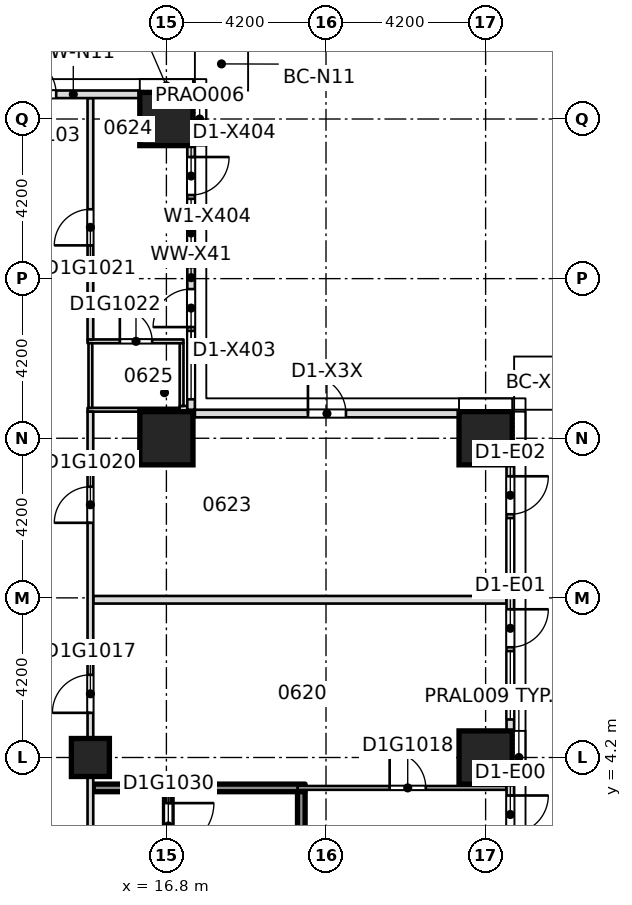
"""IFC4 building model, lengths in metres.
Left out: names, types, materials, properties, quantities, classifications, styles, units other than length and angle.
Written with IfcOpenShell. Run it as: python <this file> out.ifc"""

import sys

from ifc_helpers import new_model, si_unit, direction, frame, frame_2d, origin, origin_2d, place, context, subcontext, project, spatial, rectangle, extrude, element, fill, save


model = new_model("IFC4")
c1 = context("Model", 3, precision=1e-05, world=origin(), true_north=direction((0.0, 1.0)))
c2 = subcontext(c1, "Body", "Model", "MODEL_VIEW")
j1 = project(units=[si_unit("LENGTHUNIT", "METRE"), si_unit("PLANEANGLEUNIT", "RADIAN")], contexts=[c1])
p1 = place(None, origin())
s1 = spatial("IfcSite", under=j1, at=p1, CompositionType="ELEMENT")
p2 = place(p1, origin())
s2 = spatial("IfcBuilding", under=s1, at=p2, CompositionType="ELEMENT")
p3 = place(p2, frame((0.0, 0.0, 34.5)))
s3 = spatial("IfcBuildingStorey", under=s2, at=p3, CompositionType="ELEMENT", Elevation=34.5)
for number, where, z_axis, x_axis in (
    (1, (25.2, 4.2, -0.32), (0.0, 0.0, 1.0), (1.0, 0.0, 0.0)),
    (2, (16.8, 12.6, -0.32), (0.0, 0.0, 1.0), (1.0, 0.0, 0.0)),
    (3, (25.2, 12.6, -0.32), (0.0, 0.0, 1.0), (1.0, 0.0, 0.0)),
    (4, (16.8, 21.0, -0.32), (0.0, 0.0, 1.0), (1.0, 0.0, 0.0)),
):
    element("IfcColumn", number, at=place(p3, frame(where, z_axis=z_axis, x_axis=x_axis)), inside=s3, PredefinedType="COLUMN", context=c2, shape_type="SweptSolid", body=[
        extrude(rectangle(XDim=1.4, YDim=1.4, at=origin_2d()), origin(), (0.0, 0.0, 1.0), 3.45),
    ])
p4 = place(p3, frame((14.8, 4.2, -0.32), z_axis=(0.0, 0.0, 1.0), x_axis=(1.0, 0.0, 0.0)))
e5 = element("IfcColumn", 5, at=p4, inside=s3, PredefinedType="COLUMN", context=c2, shape_type="SweptSolid", body=[
    extrude(rectangle(XDim=1.0, YDim=1.0, at=origin_2d()), origin(), (0.0, 0.0, 1.0), 3.45),
])
p5 = place(p3, frame((14.875, 3.4, 0.0), z_axis=(0.0, 0.0, 1.0), x_axis=(1.0, 0.0, 0.0)))
e6 = element("IfcWall", 6, at=p5, inside=s3, PredefinedType="SOLIDWALL", context=c2, shape_type="SweptSolid", body=[
    extrude(rectangle(XDim=5.575, YDim=0.2, at=frame_2d((2.788, 0.0))), origin(), (0.0, 0.0, 1.0), 3.13),
])
p6 = place(p3, frame((20.25, 3.4, 0.0), z_axis=(0.0, 0.0, 1.0), x_axis=(1.0, 0.0, 0.0)))
e7 = element("IfcWall", 7, at=p6, inside=s3, PredefinedType="PARTITIONING", context=c2, shape_type="SweptSolid", body=[
    extrude(rectangle(XDim=5.5, YDim=0.1, at=frame_2d((2.75, 0.0))), origin(), (0.0, 0.0, 1.0), 3.13),
])
p7 = place(p6, frame((2.425, 0.0, 0.0)))
e8 = element("IfcOpeningElement", 8, at=p7, cuts=e7, PredefinedType="OPENING", context=c2, shape_type="SweptSolid", body=[
    extrude(rectangle(XDim=0.95, YDim=2.1, at=frame_2d((0.475, 1.05))), frame((0.0, 0.06, 0.0), z_axis=(0.0, -1.0, 0.0), x_axis=(1.0, 0.0, 0.0)), (0.0, 0.0, 1.0), 0.12),
])
p8 = place(p3, frame((14.875, 8.35, 0.0), z_axis=(0.0, 0.0, 1.0), x_axis=(1.0, 0.0, 0.0)))
e9 = element("IfcWall", 9, at=p8, inside=s3, PredefinedType="PARTITIONING", context=c2, shape_type="SweptSolid", body=[
    extrude(rectangle(XDim=10.875, YDim=0.2, at=frame_2d((5.438, 0.0))), origin(), (0.0, 0.0, 1.0), 3.13),
])
p9 = place(p3, frame((14.725, 13.35, 0.0), z_axis=(0.0, 0.0, 1.0), x_axis=(1.0, 0.0, 0.0)))
e10 = element("IfcWall", 10, at=p9, inside=s3, PredefinedType="PARTITIONING", context=c2, shape_type="SweptSolid", body=[
    extrude(rectangle(XDim=2.525, YDim=0.1, at=frame_2d((1.262, 0.0))), origin(), (0.0, 0.0, 1.0), 3.13),
])
p10 = place(p3, frame((17.15, 13.35, 0.0), z_axis=(0.0, 0.0, 1.0), x_axis=(1.0, 0.0, 0.0)))
e11 = element("IfcWall", 11, at=p10, inside=s3, PredefinedType="PARTITIONING", context=c2, shape_type="SweptSolid", body=[
    extrude(rectangle(XDim=0.2, YDim=0.2, at=frame_2d((0.1, 0.0))), origin(), (0.0, 0.0, 1.0), 3.13),
])
p11 = place(p3, frame((14.725, 15.15, 0.0), z_axis=(0.0, 0.0, 1.0), x_axis=(1.0, 0.0, 0.0)))
e12 = element("IfcWall", 12, at=p11, inside=s3, PredefinedType="PARTITIONING", context=c2, shape_type="SweptSolid", body=[
    extrude(rectangle(XDim=2.525, YDim=0.1, at=frame_2d((1.262, 0.0))), origin(), (0.0, 0.0, 1.0), 3.13),
])
p12 = place(p11, frame((0.85, 0.0, 0.0)))
e13 = element("IfcOpeningElement", 13, at=p12, cuts=e12, PredefinedType="OPENING", context=c2, shape_type="SweptSolid", body=[
    extrude(rectangle(XDim=0.85, YDim=2.1, at=frame_2d((0.425, 1.05))), frame((0.0, 0.06, 0.0), z_axis=(0.0, -1.0, 0.0), x_axis=(1.0, 0.0, 0.0)), (0.0, 0.0, 1.0), 0.12),
])
p13 = place(p3, frame((14.8, -10.525, 0.0), z_axis=(0.0, 0.0, 1.0), x_axis=(0.0, 1.0, 0.0)))
e14 = element("IfcWall", 14, at=p13, inside=s3, PredefinedType="PARTITIONING", context=c2, shape_type="SweptSolid", body=[
    extrude(rectangle(XDim=23.825, YDim=0.15, at=frame_2d((11.913, 0.0))), origin(), (0.0, 0.0, 1.0), 3.13),
])
p14 = place(p13, frame((0.925, 0.0, 0.0)))
e15 = element("IfcOpeningElement", 15, at=p14, cuts=e14, PredefinedType="OPENING", context=c2, shape_type="SweptSolid", body=[
    extrude(rectangle(XDim=1.0, YDim=2.1, at=frame_2d((0.5, 1.05))), frame((0.0, 0.085, 0.0), z_axis=(0.0, -1.0, 0.0), x_axis=(1.0, 0.0, 0.0)), (0.0, 0.0, 1.0), 0.17),
])
p15 = place(p13, frame((15.9, 0.0, 0.0)))
e16 = element("IfcOpeningElement", 16, at=p15, cuts=e14, PredefinedType="OPENING", context=c2, shape_type="SweptSolid", body=[
    extrude(rectangle(XDim=1.0, YDim=2.1, at=frame_2d((0.5, 1.05))), frame((0.0, 0.085, 0.0), z_axis=(0.0, -1.0, 0.0), x_axis=(1.0, 0.0, 0.0)), (0.0, 0.0, 1.0), 0.17),
])
p16 = place(p13, frame((20.9, 0.0, 0.0)))
e17 = element("IfcOpeningElement", 17, at=p16, cuts=e14, PredefinedType="OPENING", context=c2, shape_type="SweptSolid", body=[
    extrude(rectangle(XDim=0.95, YDim=2.1, at=frame_2d((0.475, 1.05))), frame((0.0, 0.085, 0.0), z_axis=(0.0, -1.0, 0.0), x_axis=(1.0, 0.0, 0.0)), (0.0, 0.0, 1.0), 0.17),
])
p17 = place(p13, frame((9.975, 0.0, 0.0)))
e18 = element("IfcOpeningElement", 18, at=p17, cuts=e14, PredefinedType="OPENING", context=c2, shape_type="SweptSolid", body=[
    extrude(rectangle(XDim=1.1, YDim=2.1, at=frame_2d((0.55, 1.05))), frame((0.0, 0.085, 0.0), z_axis=(0.0, -1.0, 0.0), x_axis=(1.0, 0.0, 0.0)), (0.0, 0.0, 1.0), 0.17),
])
p18 = place(p13, frame((4.725, 0.0, 0.0)))
e19 = element("IfcOpeningElement", 19, at=p18, cuts=e14, PredefinedType="OPENING", context=c2, shape_type="SweptSolid", body=[
    extrude(rectangle(XDim=1.0, YDim=2.1, at=frame_2d((0.5, 1.05))), frame((0.0, 0.085, 0.0), z_axis=(0.0, -1.0, 0.0), x_axis=(1.0, 0.0, 0.0)), (0.0, 0.0, 1.0), 0.17),
])
p19 = place(p3, frame((14.8, 13.4, 0.0), z_axis=(0.0, 0.0, 1.0), x_axis=(0.0, 1.0, 0.0)))
e20 = element("IfcWall", 20, at=p19, inside=s3, PredefinedType="PARTITIONING", context=c2, shape_type="SweptSolid", body=[
    extrude(rectangle(XDim=1.7, YDim=0.1, at=frame_2d((0.85, 0.0))), origin(), (0.0, 0.0, 1.0), 3.13),
])
p20 = place(p3, frame((14.8, 15.2, 0.0), z_axis=(0.0, 0.0, 1.0), x_axis=(0.0, 1.0, 0.0)))
e21 = element("IfcWall", 21, at=p20, inside=s3, PredefinedType="PARTITIONING", context=c2, shape_type="SweptSolid", body=[
    extrude(rectangle(XDim=6.35, YDim=0.15, at=frame_2d((3.175, 0.0))), origin(), (0.0, 0.0, 1.0), 3.13),
])
p21 = place(p20, frame((2.475, 0.0, 0.0)))
e22 = element("IfcOpeningElement", 22, at=p21, cuts=e21, PredefinedType="OPENING", context=c2, shape_type="SweptSolid", body=[
    extrude(rectangle(XDim=0.95, YDim=2.1, at=frame_2d((0.475, 1.05))), frame((0.0, 0.085, 0.0), z_axis=(0.0, -1.0, 0.0), x_axis=(1.0, 0.0, 0.0)), (0.0, 0.0, 1.0), 0.17),
])
p22 = place(p3, frame((16.85, -3.3, 0.0), z_axis=(0.0, 0.0, 1.0), x_axis=(0.0, 1.0, 0.0)))
e23 = element("IfcWall", 23, at=p22, inside=s3, PredefinedType="SOLIDWALL", context=c2, shape_type="SweptSolid", body=[
    extrude(rectangle(XDim=6.6, YDim=0.2, at=frame_2d((3.3, 0.0))), origin(), (0.0, 0.0, 1.0), 3.13),
])
p23 = place(p22, frame((5.1, 0.0, 0.0)))
e24 = element("IfcOpeningElement", 24, at=p23, cuts=e23, PredefinedType="OPENING", context=c2, shape_type="SweptSolid", body=[
    extrude(rectangle(XDim=1.2, YDim=2.1, at=frame_2d((0.6, 1.05))), frame((0.0, 0.11, 0.0), z_axis=(0.0, -1.0, 0.0), x_axis=(1.0, 0.0, 0.0)), (0.0, 0.0, 1.0), 0.22),
])
p24 = place(p3, frame((17.2, 13.45, 0.0), z_axis=(0.0, 0.0, 1.0), x_axis=(0.0, 1.0, 0.0)))
e25 = element("IfcWall", 25, at=p24, inside=s3, PredefinedType="PARTITIONING", context=c2, shape_type="SweptSolid", body=[
    extrude(rectangle(XDim=1.65, YDim=0.1, at=frame_2d((0.825, 0.0))), origin(), (0.0, 0.0, 1.0), 3.13),
])
p25 = place(p3, frame((20.35, -0.53, 0.0), z_axis=(0.0, 0.0, 1.0), x_axis=(0.0, 1.0, 0.0)))
e26 = element("IfcWall", 26, at=p25, inside=s3, PredefinedType="SOLIDWALL", context=c2, shape_type="SweptSolid", body=[
    extrude(rectangle(XDim=3.83, YDim=0.2, at=frame_2d((1.915, 0.0))), origin(), (0.0, 0.0, 1.0), 3.13),
])
p26 = place(p3, frame((25.85, -3.5, 0.0), z_axis=(0.0, 0.0, 1.0), x_axis=(0.0, 1.0, 0.0)))
e27 = element("IfcWall", 27, at=p26, inside=s3, PredefinedType="STANDARD", context=c2, shape_type="SweptSolid", body=[
    extrude(rectangle(XDim=7.0, YDim=0.2, at=frame_2d((3.5, 0.0))), origin(), (0.0, 0.0, 1.0), 3.13),
])
p27 = place(p26, frame((0.3, 0.0, 0.2)))
e28 = element("IfcOpeningElement", 28, at=p27, cuts=e27, PredefinedType="OPENING", context=c2, shape_type="SweptSolid", body=[
    extrude(rectangle(XDim=1.8, YDim=2.65, at=frame_2d((0.9, 1.325))), frame((0.0, 0.11, 0.0), z_axis=(0.0, -1.0, 0.0), x_axis=(1.0, 0.0, 0.0)), (0.0, 0.0, 1.0), 0.22),
])
p28 = place(p26, frame((2.2, 0.0, 0.0)))
e29 = element("IfcOpeningElement", 29, at=p28, cuts=e27, PredefinedType="OPENING", context=c2, shape_type="SweptSolid", body=[
    extrude(rectangle(XDim=1.0, YDim=2.4, at=frame_2d((0.5, 1.2))), frame((0.0, 0.11, 0.0), z_axis=(0.0, -1.0, 0.0), x_axis=(1.0, 0.0, 0.0)), (0.0, 0.0, 1.0), 0.22),
])
p29 = place(p26, frame((3.8, 0.0, 0.2)))
e30 = element("IfcOpeningElement", 30, at=p29, cuts=e27, PredefinedType="OPENING", context=c2, shape_type="SweptSolid", body=[
    extrude(rectangle(XDim=1.8, YDim=2.65, at=frame_2d((0.9, 1.325))), frame((0.0, 0.11, 0.0), z_axis=(0.0, -1.0, 0.0), x_axis=(1.0, 0.0, 0.0)), (0.0, 0.0, 1.0), 0.22),
])
p30 = place(p26, frame((5.7, 0.0, 0.0)))
e31 = element("IfcOpeningElement", 31, at=p30, cuts=e27, PredefinedType="OPENING", context=c2, shape_type="SweptSolid", body=[
    extrude(rectangle(XDim=1.0, YDim=2.4, at=frame_2d((0.5, 1.2))), frame((0.0, 0.11, 0.0), z_axis=(0.0, -1.0, 0.0), x_axis=(1.0, 0.0, 0.0)), (0.0, 0.0, 1.0), 0.22),
])
p31 = place(p3, frame((25.85, 4.9, 0.0), z_axis=(0.0, 0.0, 1.0), x_axis=(0.0, 1.0, 0.0)))
e32 = element("IfcWall", 32, at=p31, inside=s3, PredefinedType="STANDARD", context=c2, shape_type="SweptSolid", body=[
    extrude(rectangle(XDim=7.0, YDim=0.2, at=frame_2d((3.5, 0.0))), origin(), (0.0, 0.0, 1.0), 3.13),
])
p32 = place(p31, frame((0.3, 0.0, 0.2)))
e33 = element("IfcOpeningElement", 33, at=p32, cuts=e32, PredefinedType="OPENING", context=c2, shape_type="SweptSolid", body=[
    extrude(rectangle(XDim=1.8, YDim=2.65, at=frame_2d((0.9, 1.325))), frame((0.0, 0.11, 0.0), z_axis=(0.0, -1.0, 0.0), x_axis=(1.0, 0.0, 0.0)), (0.0, 0.0, 1.0), 0.22),
])
p33 = place(p31, frame((2.2, 0.0, 0.0)))
e34 = element("IfcOpeningElement", 34, at=p33, cuts=e32, PredefinedType="OPENING", context=c2, shape_type="SweptSolid", body=[
    extrude(rectangle(XDim=1.0, YDim=2.4, at=frame_2d((0.5, 1.2))), frame((0.0, 0.11, 0.0), z_axis=(0.0, -1.0, 0.0), x_axis=(1.0, 0.0, 0.0)), (0.0, 0.0, 1.0), 0.22),
])
p34 = place(p31, frame((3.8, 0.0, 0.2)))
e35 = element("IfcOpeningElement", 35, at=p34, cuts=e32, PredefinedType="OPENING", context=c2, shape_type="SweptSolid", body=[
    extrude(rectangle(XDim=1.8, YDim=2.65, at=frame_2d((0.9, 1.325))), frame((0.0, 0.11, 0.0), z_axis=(0.0, -1.0, 0.0), x_axis=(1.0, 0.0, 0.0)), (0.0, 0.0, 1.0), 0.22),
])
p35 = place(p31, frame((5.7, 0.0, 0.0)))
e36 = element("IfcOpeningElement", 36, at=p35, cuts=e32, PredefinedType="OPENING", context=c2, shape_type="SweptSolid", body=[
    extrude(rectangle(XDim=1.0, YDim=2.4, at=frame_2d((0.5, 1.2))), frame((0.0, 0.11, 0.0), z_axis=(0.0, -1.0, 0.0), x_axis=(1.0, 0.0, 0.0)), (0.0, 0.0, 1.0), 0.22),
])
p36 = place(p3, frame((24.5, 13.25, 0.0), z_axis=(0.0, 0.0, 1.0), x_axis=(-1.0, 0.0, 0.0)))
e37 = element("IfcWall", 37, at=p36, inside=s3, PredefinedType="STANDARD", context=c2, shape_type="SweptSolid", body=[
    extrude(rectangle(XDim=6.95, YDim=0.2, at=frame_2d((3.475, 0.0))), origin(), (0.0, 0.0, 1.0), 3.13),
])
p37 = place(p36, frame((2.975, 0.0, 0.0)))
e38 = element("IfcOpeningElement", 38, at=p37, cuts=e37, PredefinedType="OPENING", context=c2, shape_type="SweptSolid", body=[
    extrude(rectangle(XDim=1.0, YDim=2.4, at=frame_2d((0.5, 1.2))), frame((0.0, 0.11, 0.0), z_axis=(0.0, -1.0, 0.0), x_axis=(1.0, 0.0, 0.0)), (0.0, 0.0, 1.0), 0.22),
])
p38 = place(p3, frame((17.45, 13.35, 0.0), z_axis=(0.0, 0.0, 1.0), x_axis=(0.0, 1.0, 0.0)))
e39 = element("IfcWall", 39, at=p38, inside=s3, PredefinedType="STANDARD", context=c2, shape_type="SweptSolid", body=[
    extrude(rectangle(XDim=6.95, YDim=0.2, at=frame_2d((3.475, 0.0))), origin(), (0.0, 0.0, 1.0), 3.13),
])
p39 = place(p38, frame((0.275, 0.0, 0.2)))
e40 = element("IfcOpeningElement", 40, at=p39, cuts=e39, PredefinedType="OPENING", context=c2, shape_type="SweptSolid", body=[
    extrude(rectangle(XDim=1.8, YDim=2.65, at=frame_2d((0.9, 1.325))), frame((0.0, 0.11, 0.0), z_axis=(0.0, -1.0, 0.0), x_axis=(1.0, 0.0, 0.0)), (0.0, 0.0, 1.0), 0.22),
])
p40 = place(p38, frame((2.175, 0.0, 0.0)))
e41 = element("IfcOpeningElement", 41, at=p40, cuts=e39, PredefinedType="OPENING", context=c2, shape_type="SweptSolid", body=[
    extrude(rectangle(XDim=1.0, YDim=2.4, at=frame_2d((0.5, 1.2))), frame((0.0, 0.11, 0.0), z_axis=(0.0, -1.0, 0.0), x_axis=(1.0, 0.0, 0.0)), (0.0, 0.0, 1.0), 0.22),
])
p41 = place(p38, frame((3.75, 0.0, 0.2)))
e42 = element("IfcOpeningElement", 42, at=p41, cuts=e39, PredefinedType="OPENING", context=c2, shape_type="SweptSolid", body=[
    extrude(rectangle(XDim=1.8, YDim=2.65, at=frame_2d((0.9, 1.325))), frame((0.0, 0.11, 0.0), z_axis=(0.0, -1.0, 0.0), x_axis=(1.0, 0.0, 0.0)), (0.0, 0.0, 1.0), 0.22),
])
p42 = place(p38, frame((5.65, 0.0, 0.0)))
e43 = element("IfcOpeningElement", 43, at=p42, cuts=e39, PredefinedType="OPENING", context=c2, shape_type="SweptSolid", body=[
    extrude(rectangle(XDim=1.0, YDim=2.4, at=frame_2d((0.5, 1.2))), frame((0.0, 0.11, 0.0), z_axis=(0.0, -1.0, 0.0), x_axis=(1.0, 0.0, 0.0)), (0.0, 0.0, 1.0), 0.22),
])
p43 = place(p3, frame((16.1, 21.65, 0.0), z_axis=(0.0, 0.0, 1.0), x_axis=(-1.0, 0.0, 0.0)))
e44 = element("IfcWall", 44, at=p43, inside=s3, PredefinedType="STANDARD", context=c2, shape_type="SweptSolid", body=[
    extrude(rectangle(XDim=3.5, YDim=0.2, at=frame_2d((1.75, 0.0))), origin(), (0.0, 0.0, 1.0), 3.13),
])
p44 = place(p43, frame((2.2, 0.0, 0.0)))
e45 = element("IfcOpeningElement", 45, at=p44, cuts=e44, PredefinedType="OPENING", context=c2, shape_type="SweptSolid", body=[
    extrude(rectangle(XDim=1.0, YDim=2.4, at=frame_2d((0.5, 1.2))), frame((0.0, 0.11, 0.0), z_axis=(0.0, -1.0, 0.0), x_axis=(1.0, 0.0, 0.0)), (0.0, 0.0, 1.0), 0.22),
])
p45 = place(p15, origin())
e46 = element("IfcDoor", 46, at=p45, inside=s3, OperationType="SINGLE_SWING_LEFT", PredefinedType="DOOR", context=c2, shape_type="SweptSolid", body=[
    extrude(rectangle(XDim=1.0, YDim=2.1, at=frame_2d((0.5, 1.05))), frame((0.0, 0.025, 0.0), z_axis=(0.0, -1.0, 0.0), x_axis=(1.0, 0.0, 0.0)), (0.0, 0.0, 1.0), 0.05),
])
fill(e16, e46)
p46 = place(p7, origin())
e47 = element("IfcDoor", 47, at=p46, inside=s3, OperationType="SINGLE_SWING_LEFT", PredefinedType="DOOR", context=c2, shape_type="SweptSolid", body=[
    extrude(rectangle(XDim=0.95, YDim=2.1, at=frame_2d((0.475, 1.05))), frame((0.0, 0.025, 0.0), z_axis=(0.0, -1.0, 0.0), x_axis=(1.0, 0.0, 0.0)), (0.0, 0.0, 1.0), 0.05),
])
fill(e8, e47)
p47 = place(p16, origin())
e48 = element("IfcDoor", 48, at=p47, inside=s3, OperationType="SINGLE_SWING_LEFT", PredefinedType="DOOR", context=c2, shape_type="SweptSolid", body=[
    extrude(rectangle(XDim=0.95, YDim=2.1, at=frame_2d((0.475, 1.05))), frame((0.0, 0.025, 0.0), z_axis=(0.0, -1.0, 0.0), x_axis=(1.0, 0.0, 0.0)), (0.0, 0.0, 1.0), 0.05),
])
fill(e17, e48)
p48 = place(p21, origin())
e49 = element("IfcDoor", 49, at=p48, inside=s3, OperationType="SINGLE_SWING_LEFT", PredefinedType="DOOR", context=c2, shape_type="SweptSolid", body=[
    extrude(rectangle(XDim=0.95, YDim=2.1, at=frame_2d((0.475, 1.05))), frame((0.0, 0.025, 0.0), z_axis=(0.0, -1.0, 0.0), x_axis=(1.0, 0.0, 0.0)), (0.0, 0.0, 1.0), 0.05),
])
fill(e22, e49)
p49 = place(p12, origin())
e50 = element("IfcDoor", 50, at=p49, inside=s3, OperationType="SINGLE_SWING_RIGHT", PredefinedType="DOOR", context=c2, shape_type="SweptSolid", body=[
    extrude(rectangle(XDim=0.85, YDim=2.1, at=frame_2d((0.425, 1.05))), frame((0.0, 0.025, 0.0), z_axis=(0.0, -1.0, 0.0), x_axis=(1.0, 0.0, 0.0)), (0.0, 0.0, 1.0), 0.05),
])
fill(e13, e50)
p50 = place(p23, origin())
e51 = element("IfcDoor", 51, at=p50, inside=s3, OperationType="SINGLE_SWING_LEFT", PredefinedType="DOOR", context=c2, shape_type="SweptSolid", body=[
    extrude(rectangle(XDim=1.2, YDim=2.1, at=frame_2d((0.6, 1.05))), frame((0.0, 0.025, 0.0), z_axis=(0.0, -1.0, 0.0), x_axis=(1.0, 0.0, 0.0)), (0.0, 0.0, 1.0), 0.05),
])
fill(e24, e51)
p51 = place(p30, origin())
e52 = element("IfcDoor", 52, at=p51, inside=s3, OperationType="SINGLE_SWING_LEFT", PredefinedType="DOOR", context=c2, shape_type="SweptSolid", body=[
    extrude(rectangle(XDim=1.0, YDim=2.4, at=frame_2d((0.5, 1.2))), frame((0.0, 0.025, 0.0), z_axis=(0.0, -1.0, 0.0), x_axis=(1.0, 0.0, 0.0)), (0.0, 0.0, 1.0), 0.05),
])
fill(e31, e52)
p52 = place(p32, origin())
e53 = element("IfcWindow", 53, at=p52, inside=s3, PartitioningType="SINGLE_PANEL", PredefinedType="WINDOW", context=c2, shape_type="SweptSolid", body=[
    extrude(rectangle(XDim=1.8, YDim=2.65, at=frame_2d((0.9, 1.325))), frame((0.0, 0.03, 0.0), z_axis=(0.0, -1.0, 0.0), x_axis=(1.0, 0.0, 0.0)), (0.0, 0.0, 1.0), 0.06),
])
fill(e33, e53)
p53 = place(p33, origin())
e54 = element("IfcDoor", 54, at=p53, inside=s3, OperationType="SINGLE_SWING_LEFT", PredefinedType="DOOR", context=c2, shape_type="SweptSolid", body=[
    extrude(rectangle(XDim=1.0, YDim=2.4, at=frame_2d((0.5, 1.2))), frame((0.0, 0.025, 0.0), z_axis=(0.0, -1.0, 0.0), x_axis=(1.0, 0.0, 0.0)), (0.0, 0.0, 1.0), 0.05),
])
fill(e34, e54)
p54 = place(p34, origin())
e55 = element("IfcWindow", 55, at=p54, inside=s3, PartitioningType="SINGLE_PANEL", PredefinedType="WINDOW", context=c2, shape_type="SweptSolid", body=[
    extrude(rectangle(XDim=1.8, YDim=2.65, at=frame_2d((0.9, 1.325))), frame((0.0, 0.03, 0.0), z_axis=(0.0, -1.0, 0.0), x_axis=(1.0, 0.0, 0.0)), (0.0, 0.0, 1.0), 0.06),
])
fill(e35, e55)
p55 = place(p35, origin())
e56 = element("IfcDoor", 56, at=p55, inside=s3, OperationType="SINGLE_SWING_LEFT", PredefinedType="DOOR", context=c2, shape_type="SweptSolid", body=[
    extrude(rectangle(XDim=1.0, YDim=2.4, at=frame_2d((0.5, 1.2))), frame((0.0, 0.025, 0.0), z_axis=(0.0, -1.0, 0.0), x_axis=(1.0, 0.0, 0.0)), (0.0, 0.0, 1.0), 0.05),
])
fill(e36, e56)
p56 = place(p37, origin())
e57 = element("IfcDoor", 57, at=p56, inside=s3, OperationType="SINGLE_SWING_LEFT", PredefinedType="DOOR", context=c2, shape_type="SweptSolid", body=[
    extrude(rectangle(XDim=1.0, YDim=2.4, at=frame_2d((0.5, 1.2))), frame((0.0, 0.025, 0.0), z_axis=(0.0, -1.0, 0.0), x_axis=(1.0, 0.0, 0.0)), (0.0, 0.0, 1.0), 0.05),
])
fill(e38, e57)
p57 = place(p39, origin())
e58 = element("IfcWindow", 58, at=p57, inside=s3, PartitioningType="SINGLE_PANEL", PredefinedType="WINDOW", context=c2, shape_type="SweptSolid", body=[
    extrude(rectangle(XDim=1.8, YDim=2.65, at=frame_2d((0.9, 1.325))), frame((0.0, 0.03, 0.0), z_axis=(0.0, -1.0, 0.0), x_axis=(1.0, 0.0, 0.0)), (0.0, 0.0, 1.0), 0.06),
])
fill(e40, e58)
p58 = place(p40, origin())
e59 = element("IfcDoor", 59, at=p58, inside=s3, OperationType="SINGLE_SWING_LEFT", PredefinedType="DOOR", context=c2, shape_type="SweptSolid", body=[
    extrude(rectangle(XDim=1.0, YDim=2.4, at=frame_2d((0.5, 1.2))), frame((0.0, 0.025, 0.0), z_axis=(0.0, -1.0, 0.0), x_axis=(1.0, 0.0, 0.0)), (0.0, 0.0, 1.0), 0.05),
])
fill(e41, e59)
p59 = place(p41, origin())
e60 = element("IfcWindow", 60, at=p59, inside=s3, PartitioningType="SINGLE_PANEL", PredefinedType="WINDOW", context=c2, shape_type="SweptSolid", body=[
    extrude(rectangle(XDim=1.8, YDim=2.65, at=frame_2d((0.9, 1.325))), frame((0.0, 0.03, 0.0), z_axis=(0.0, -1.0, 0.0), x_axis=(1.0, 0.0, 0.0)), (0.0, 0.0, 1.0), 0.06),
])
fill(e42, e60)
p60 = place(p42, origin())
e61 = element("IfcDoor", 61, at=p60, inside=s3, OperationType="SINGLE_SWING_LEFT", PredefinedType="DOOR", context=c2, shape_type="SweptSolid", body=[
    extrude(rectangle(XDim=1.0, YDim=2.4, at=frame_2d((0.5, 1.2))), frame((0.0, 0.025, 0.0), z_axis=(0.0, -1.0, 0.0), x_axis=(1.0, 0.0, 0.0)), (0.0, 0.0, 1.0), 0.05),
])
fill(e43, e61)
p61 = place(p44, origin())
e62 = element("IfcDoor", 62, at=p61, inside=s3, OperationType="SINGLE_SWING_LEFT", PredefinedType="DOOR", context=c2, shape_type="SweptSolid", body=[
    extrude(rectangle(XDim=1.0, YDim=2.4, at=frame_2d((0.5, 1.2))), frame((0.0, 0.025, 0.0), z_axis=(0.0, -1.0, 0.0), x_axis=(1.0, 0.0, 0.0)), (0.0, 0.0, 1.0), 0.05),
])
fill(e45, e62)
save(model, sys.argv[1])
